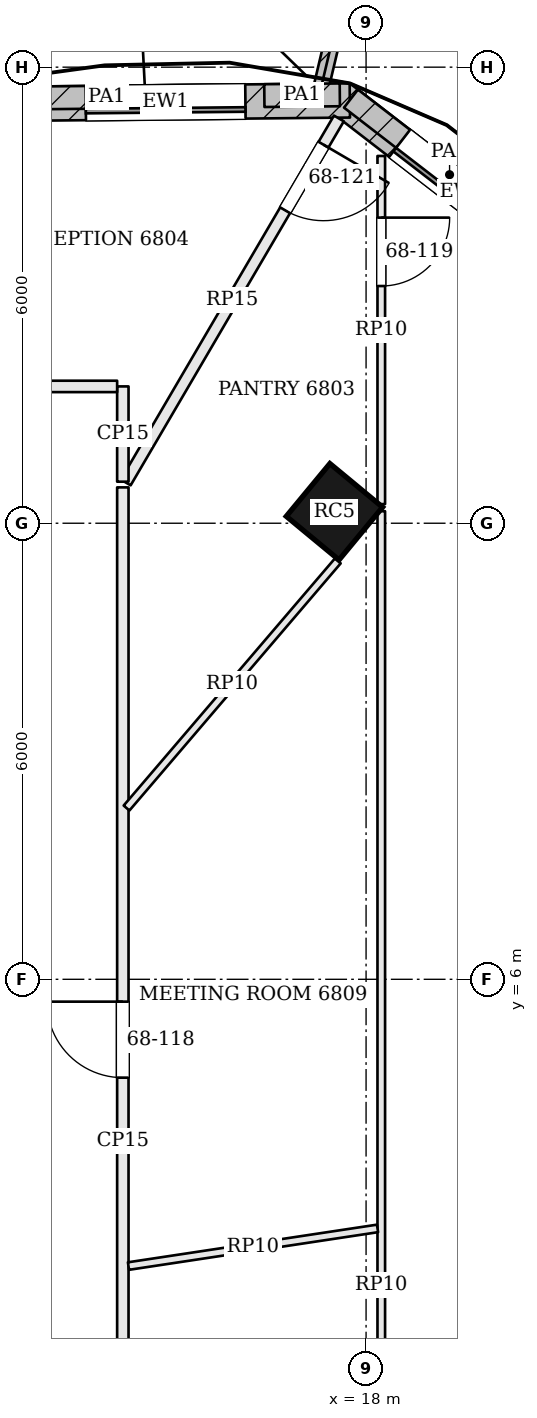
"""IFC4 building model, lengths in metres.
Left out: names, types, materials, properties, quantities, classifications, styles, units other than length and angle.
Written with IfcOpenShell. Run it as: python <this file> out.ifc"""

import sys

from ifc_helpers import new_model, si_unit, direction, frame, frame_2d, origin, origin_2d, place, context, subcontext, project, spatial, rectangle, extrude, element, fill, save


model = new_model("IFC4")
c1 = context("Model", 3, precision=1e-05, world=origin(), true_north=direction((0.0, 1.0)))
c2 = subcontext(c1, "Body", "Model", "MODEL_VIEW")
j1 = project(units=[si_unit("LENGTHUNIT", "METRE"), si_unit("PLANEANGLEUNIT", "RADIAN")], contexts=[c1])
p1 = place(None, origin())
s1 = spatial("IfcSite", under=j1, at=p1, CompositionType="ELEMENT")
p2 = place(p1, origin())
s2 = spatial("IfcBuilding", under=s1, at=p2, CompositionType="ELEMENT")
p3 = place(p2, frame((0.0, 0.0, 276.6)))
s3 = spatial("IfcBuildingStorey", under=s2, at=p3, CompositionType="ELEMENT", Elevation=276.6)
p4 = place(p3, frame((17.584, 12.151, 0.0), z_axis=(0.0, 0.0, 1.0), x_axis=(-0.770679191336, 0.637223339216, 0.0)))
e1 = element("IfcColumn", 1, at=p4, inside=s3, PredefinedType="COLUMN", context=c2, shape_type="SweptSolid", body=[
    extrude(rectangle(XDim=0.9, YDim=0.9, at=origin_2d()), origin(), (0.0, 0.0, 1.0), 3.9),
])
p5 = place(p3, frame((20.896, 15.104, 0.0), z_axis=(0.0, 0.0, 1.0), x_axis=(-0.791693388686, 0.610918634771, 0.0)))
e2 = element("IfcWall", 2, at=p5, inside=s3, PredefinedType="SOLIDWALL", context=c2, shape_type="SweptSolid", body=[
    extrude(rectangle(XDim=4.1, YDim=0.45, at=frame_2d((2.05, 0.0))), origin(), (0.0, 0.0, 1.0), 3.7),
])
p6 = place(p5, frame((1.0, 0.0, 0.9)))
e3 = element("IfcOpeningElement", 3, at=p6, cuts=e2, PredefinedType="OPENING", context=c2, shape_type="SweptSolid", body=[
    extrude(rectangle(XDim=2.1, YDim=2.3, at=frame_2d((1.05, 1.15))), frame((0.0, 0.235, 0.0), z_axis=(0.0, -1.0, 0.0), x_axis=(1.0, 0.0, 0.0)), (0.0, 0.0, 1.0), 0.47),
])
p7 = place(p3, frame((17.786, 17.562, 0.0), z_axis=(0.0, 0.0, 1.0), x_axis=(-0.999950280333, -0.00997180335, 0.0)))
e4 = element("IfcWall", 4, at=p7, inside=s3, PredefinedType="SOLIDWALL", context=c2, shape_type="SweptSolid", body=[
    extrude(rectangle(XDim=4.848, YDim=0.45, at=frame_2d((2.424, 0.0))), origin(), (0.0, 0.0, 1.0), 3.7),
])
p8 = place(p7, frame((1.374, 0.0, 0.9)))
e5 = element("IfcOpeningElement", 5, at=p8, cuts=e4, PredefinedType="OPENING", context=c2, shape_type="SweptSolid", body=[
    extrude(rectangle(XDim=2.1, YDim=2.3, at=frame_2d((1.05, 1.15))), frame((0.0, 0.235, 0.0), z_axis=(0.0, -1.0, 0.0), x_axis=(1.0, 0.0, 0.0)), (0.0, 0.0, 1.0), 0.47),
])
p9 = place(p3, frame((17.362, 17.538, 0.0), z_axis=(0.0, 0.0, 1.0), x_axis=(0.230469860183, 0.973079464148, 0.0)))
e6 = element("IfcWall", 6, at=p9, inside=s3, PredefinedType="SOLIDWALL", context=c2, shape_type="SweptSolid", body=[
    extrude(rectangle(XDim=1.75, YDim=0.2, at=frame_2d((0.875, 0.0))), origin(), (0.0, 0.0, 1.0), 3.7),
])
p10 = place(p3, frame((20.396, 15.584, 3.9), z_axis=(0.0, 0.0, 1.0), x_axis=(-0.791653544836, 0.610970265191, 0.0)))
e7 = element("IfcWall", 7, at=p10, inside=s3, PredefinedType="PARAPET", context=c2, shape_type="SweptSolid", body=[
    extrude(rectangle(XDim=3.277, YDim=0.3, at=frame_2d((1.638, 0.0))), origin(), (0.0, 0.0, 1.0), 1.1),
])
p11 = place(p3, frame((17.655, 17.636, 3.9), z_axis=(0.0, 0.0, 1.0), x_axis=(-0.999949189172, -0.010080628659, 0.0)))
e8 = element("IfcWall", 8, at=p11, inside=s3, PredefinedType="PARAPET", context=c2, shape_type="SweptSolid", body=[
    extrude(rectangle(XDim=0.993, YDim=0.3, at=frame_2d((0.497, 0.0))), origin(), (0.0, 0.0, 1.0), 1.1),
])
p12 = place(p3, frame((16.205, 17.621, 3.9), z_axis=(0.0, 0.0, 1.0), x_axis=(-0.999950267811, -0.009973058961, 0.0)))
e9 = element("IfcWall", 9, at=p12, inside=s3, PredefinedType="PARAPET", context=c2, shape_type="SweptSolid", body=[
    extrude(rectangle(XDim=3.231, YDim=0.3, at=frame_2d((1.616, 0.0))), origin(), (0.0, 0.0, 1.0), 1.1),
])
p13 = place(p3, frame((14.8, -4.725, 0.0), z_axis=(0.0, 0.0, 1.0), x_axis=(0.0, 1.0, 0.0)))
e10 = element("IfcWall", 10, at=p13, inside=s3, PredefinedType="PARTITIONING", context=c2, shape_type="SweptSolid", body=[
    extrude(rectangle(XDim=17.197, YDim=0.15, at=frame_2d((8.598, 0.0))), origin(), (0.0, 0.0, 1.0), 3.198),
])
p14 = place(p13, frame((3.427, 0.0, 0.0)))
e11 = element("IfcOpeningElement", 11, at=p14, cuts=e10, PredefinedType="OPENING", context=c2, shape_type="SweptSolid", body=[
    extrude(rectangle(XDim=1.0, YDim=2.4, at=frame_2d((0.5, 1.2))), frame((0.0, 0.085, 0.0), z_axis=(0.0, -1.0, 0.0), x_axis=(1.0, 0.0, 0.0)), (0.0, 0.0, 1.0), 0.17),
])
p15 = place(p13, frame((9.431, 0.0, 0.0)))
e12 = element("IfcOpeningElement", 12, at=p15, cuts=e10, PredefinedType="OPENING", context=c2, shape_type="SweptSolid", body=[
    extrude(rectangle(XDim=1.0, YDim=2.4, at=frame_2d((0.5, 1.2))), frame((0.0, 0.085, 0.0), z_axis=(0.0, -1.0, 0.0), x_axis=(1.0, 0.0, 0.0)), (0.0, 0.0, 1.0), 0.17),
])
p16 = place(p3, frame((17.642, 17.325, 0.0), z_axis=(0.0, 0.0, 1.0), x_axis=(-0.505311858982, -0.862936802537, 0.0)))
e13 = element("IfcWall", 13, at=p16, inside=s3, PredefinedType="PARTITIONING", context=c2, shape_type="SweptSolid", body=[
    extrude(rectangle(XDim=5.55, YDim=0.15, at=frame_2d((2.775, 0.0))), origin(), (0.0, 0.0, 1.0), 3.184),
])
p17 = place(p16, frame((0.4, 0.0, 0.0)))
e14 = element("IfcOpeningElement", 14, at=p17, cuts=e13, PredefinedType="OPENING", context=c2, shape_type="SweptSolid", body=[
    extrude(rectangle(XDim=1.0, YDim=2.1, at=frame_2d((0.5, 1.05))), frame((0.0, 0.085, 0.0), z_axis=(0.0, -1.0, 0.0), x_axis=(1.0, 0.0, 0.0)), (0.0, 0.0, 1.0), 0.17),
])
p18 = place(p3, frame((14.8, 12.547, 0.0), z_axis=(0.0, 0.0, 1.0), x_axis=(0.0, 1.0, 0.0)))
e15 = element("IfcWall", 15, at=p18, inside=s3, PredefinedType="PARTITIONING", context=c2, shape_type="SweptSolid", body=[
    extrude(rectangle(XDim=1.253, YDim=0.15, at=frame_2d((0.627, 0.0))), origin(), (0.0, 0.0, 1.0), 3.198),
])
p19 = place(p3, frame((14.725, 13.8, 0.0), z_axis=(0.0, 0.0, 1.0), x_axis=(-1.0, 0.0, 0.0)))
e16 = element("IfcWall", 16, at=p19, inside=s3, PredefinedType="PARTITIONING", context=c2, shape_type="SweptSolid", body=[
    extrude(rectangle(XDim=11.988, YDim=0.15, at=frame_2d((5.994, 0.0))), origin(), (0.0, 0.0, 1.0), 3.198),
])
p20 = place(p19, frame((3.2, 0.0, 0.0)))
e17 = element("IfcOpeningElement", 17, at=p20, cuts=e16, PredefinedType="OPENING", context=c2, shape_type="SweptSolid", body=[
    extrude(rectangle(XDim=1.8, YDim=2.1, at=frame_2d((0.9, 1.05))), frame((0.0, 0.085, 0.0), z_axis=(0.0, -1.0, 0.0), x_axis=(1.0, 0.0, 0.0)), (0.0, 0.0, 1.0), 0.17),
])
p21 = place(p19, frame((5.757, 0.0, 0.0)))
e18 = element("IfcOpeningElement", 18, at=p21, cuts=e16, PredefinedType="OPENING", context=c2, shape_type="SweptSolid", body=[
    extrude(rectangle(XDim=1.0, YDim=2.4, at=frame_2d((0.5, 1.2))), frame((0.0, 0.085, 0.0), z_axis=(0.0, -1.0, 0.0), x_axis=(1.0, 0.0, 0.0)), (0.0, 0.0, 1.0), 0.17),
])
p22 = place(p19, frame((10.25, 0.0, 0.0)))
e19 = element("IfcOpeningElement", 19, at=p22, cuts=e16, PredefinedType="OPENING", context=c2, shape_type="SweptSolid", body=[
    extrude(rectangle(XDim=0.9, YDim=2.1, at=frame_2d((0.45, 1.05))), frame((0.0, 0.085, 0.0), z_axis=(0.0, -1.0, 0.0), x_axis=(1.0, 0.0, 0.0)), (0.0, 0.0, 1.0), 0.17),
])
p23 = place(p3, frame((18.2, 16.832, 0.0), z_axis=(0.0, 0.0, 1.0), x_axis=(0.0, -1.0, 0.0)))
e20 = element("IfcWall", 20, at=p23, inside=s3, PredefinedType="PARTITIONING", context=c2, shape_type="SweptSolid", body=[
    extrude(rectangle(XDim=4.58, YDim=0.1, at=frame_2d((2.29, 0.0))), origin(), (0.0, 0.0, 1.0), 3.184),
])
p24 = place(p23, frame((0.811, 0.0, 0.0)))
e21 = element("IfcOpeningElement", 21, at=p24, cuts=e20, PredefinedType="OPENING", context=c2, shape_type="SweptSolid", body=[
    extrude(rectangle(XDim=0.9, YDim=2.1, at=frame_2d((0.45, 1.05))), frame((0.0, 0.06, 0.0), z_axis=(0.0, -1.0, 0.0), x_axis=(1.0, 0.0, 0.0)), (0.0, 0.0, 1.0), 0.12),
])
p25 = place(p3, frame((18.2, 12.158, 0.0), z_axis=(0.0, 0.0, 1.0), x_axis=(0.0, -1.0, 0.0)))
e22 = element("IfcWall", 22, at=p25, inside=s3, PredefinedType="PARTITIONING", context=c2, shape_type="SweptSolid", body=[
    extrude(rectangle(XDim=20.358, YDim=0.1, at=frame_2d((10.179, 0.0))), origin(), (0.0, 0.0, 1.0), 3.184),
])
p26 = place(p3, frame((14.874, 2.228, 0.0), z_axis=(0.0, 0.0, 1.0), x_axis=(0.988773632129, 0.149421231442, 0.0)))
e23 = element("IfcWall", 23, at=p26, inside=s3, PredefinedType="PARTITIONING", context=c2, shape_type="SweptSolid", body=[
    extrude(rectangle(XDim=3.313, YDim=0.1, at=frame_2d((1.657, 0.0))), origin(), (0.0, 0.0, 1.0), 3.184),
])
p27 = place(p3, frame((14.849, 8.253, 0.0), z_axis=(0.0, 0.0, 1.0), x_axis=(0.649817849781, 0.760089969744, 0.0)))
e24 = element("IfcWall", 24, at=p27, inside=s3, PredefinedType="PARTITIONING", context=c2, shape_type="SweptSolid", body=[
    extrude(rectangle(XDim=4.277, YDim=0.1, at=frame_2d((2.139, 0.0))), origin(), (0.0, 0.0, 1.0), 3.184),
])
p28 = place(p6, origin())
e25 = element("IfcWindow", 25, at=p28, inside=s3, PartitioningType="SINGLE_PANEL", PredefinedType="WINDOW", context=c2, shape_type="SweptSolid", body=[
    extrude(rectangle(XDim=2.1, YDim=2.3, at=frame_2d((1.05, 1.15))), frame((0.0, 0.135, 0.0), z_axis=(0.0, -1.0, 0.0), x_axis=(1.0, 0.0, 0.0)), (0.0, 0.0, 1.0), 0.06),
])
fill(e3, e25)
p29 = place(p8, origin())
e26 = element("IfcWindow", 26, at=p29, inside=s3, PartitioningType="SINGLE_PANEL", PredefinedType="WINDOW", context=c2, shape_type="SweptSolid", body=[
    extrude(rectangle(XDim=2.1, YDim=2.3, at=frame_2d((1.05, 1.15))), frame((0.0, 0.135, 0.0), z_axis=(0.0, -1.0, 0.0), x_axis=(1.0, 0.0, 0.0)), (0.0, 0.0, 1.0), 0.06),
])
fill(e5, e26)
p30 = place(p15, origin())
e27 = element("IfcDoor", 27, at=p30, inside=s3, OperationType="SINGLE_SWING_RIGHT", PredefinedType="DOOR", context=c2, shape_type="SweptSolid", body=[
    extrude(rectangle(XDim=1.0, YDim=2.4, at=frame_2d((0.5, 1.2))), frame((0.0, 0.025, 0.0), z_axis=(0.0, -1.0, 0.0), x_axis=(1.0, 0.0, 0.0)), (0.0, 0.0, 1.0), 0.05),
])
fill(e12, e27)
p31 = place(p24, origin())
e28 = element("IfcDoor", 28, at=p31, inside=s3, OperationType="SINGLE_SWING_LEFT", PredefinedType="DOOR", context=c2, shape_type="SweptSolid", body=[
    extrude(rectangle(XDim=0.9, YDim=2.1, at=frame_2d((0.45, 1.05))), frame((0.0, 0.025, 0.0), z_axis=(0.0, -1.0, 0.0), x_axis=(1.0, 0.0, 0.0)), (0.0, 0.0, 1.0), 0.05),
])
fill(e21, e28)
p32 = place(p17, origin())
e29 = element("IfcDoor", 29, at=p32, inside=s3, OperationType="SINGLE_SWING_LEFT", PredefinedType="DOOR", context=c2, shape_type="SweptSolid", body=[
    extrude(rectangle(XDim=1.0, YDim=2.1, at=frame_2d((0.5, 1.05))), frame((0.0, 0.025, 0.0), z_axis=(0.0, -1.0, 0.0), x_axis=(1.0, 0.0, 0.0)), (0.0, 0.0, 1.0), 0.05),
])
fill(e14, e29)
save(model, sys.argv[1])
